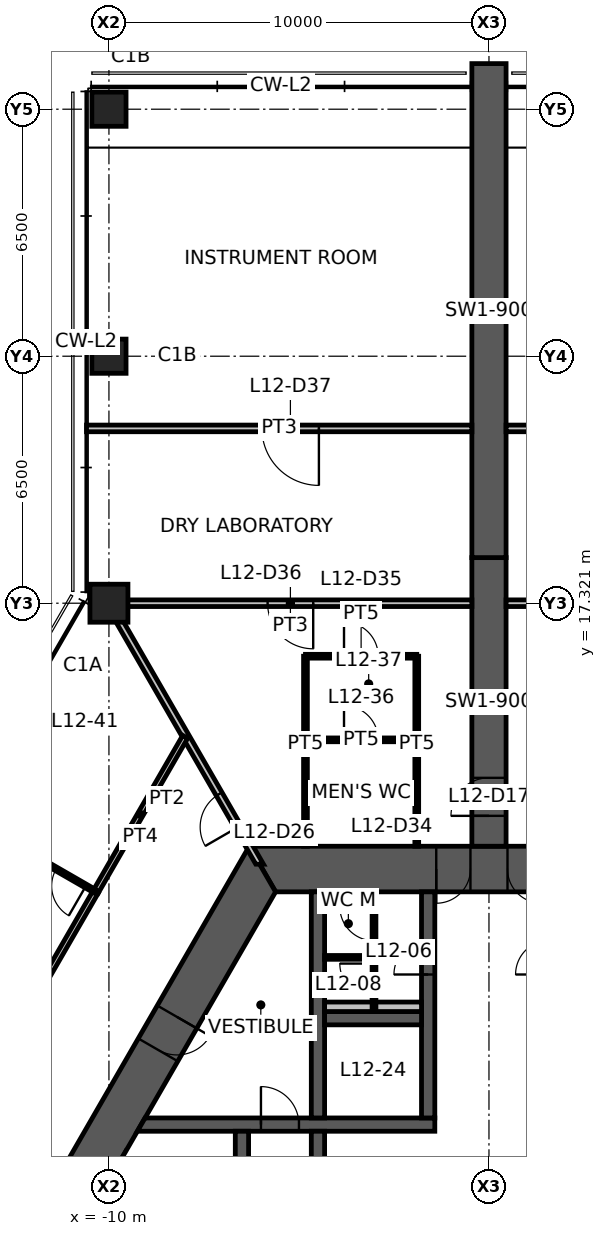
"""IFC4 building model, lengths in metres.
Left out: names, types, materials, properties, quantities, classifications, styles, units other than length and angle.
Written with IfcOpenShell. Run it as: python <this file> out.ifc"""

import sys

from ifc_helpers import new_model, si_unit, direction, frame, frame_2d, origin, origin_2d, place, context, subcontext, project, spatial, polyline, rectangle, hollow_rectangle, outline, extrude, element, fill, save


model = new_model("IFC4")
c1 = context("Model", 3, precision=1e-05, world=origin(), true_north=direction((0.0, 1.0)))
c2 = subcontext(c1, "Body", "Model", "MODEL_VIEW")
j1 = project(units=[si_unit("LENGTHUNIT", "METRE"), si_unit("PLANEANGLEUNIT", "RADIAN")], contexts=[c1])
p1 = place(None, origin())
s1 = spatial("IfcSite", under=j1, at=p1, CompositionType="ELEMENT")
p2 = place(p1, origin())
s2 = spatial("IfcBuilding", under=s1, at=p2, CompositionType="ELEMENT")
p3 = place(p2, frame((0.0, 0.0, 47.8)))
s3 = spatial("IfcBuildingStorey", under=s2, at=p3, CompositionType="ELEMENT", Elevation=47.8)
p4 = place(p3, frame((-10.0, 17.321, 0.0), z_axis=(0.0, 0.0, 1.0), x_axis=(1.0, 0.0, 0.0)))
e1 = element("IfcColumn", 1, at=p4, inside=s3, PredefinedType="COLUMN", context=c2, shape_type="SweptSolid", body=[
    extrude(hollow_rectangle(XDim=1.0, YDim=1.0, WallThickness=0.06, at=origin_2d()), origin(), (0.0, 0.0, 1.0), 4.2),
])
for number, where, z_axis, x_axis in (
    (2, (-10.0, 23.821, 0.0), (0.0, 0.0, 1.0), (1.0, 0.0, 0.0)),
    (3, (-10.0, 30.321, 0.0), (0.0, 0.0, 1.0), (1.0, 0.0, 0.0)),
):
    element("IfcColumn", number, at=place(p3, frame(where, z_axis=z_axis, x_axis=x_axis)), inside=s3, PredefinedType="COLUMN", context=c2, shape_type="SweptSolid", body=[
        extrude(hollow_rectangle(XDim=0.9, YDim=0.9, WallThickness=0.05, at=origin_2d()), origin(), (0.0, 0.0, 1.0), 4.2),
    ])
p5 = place(p3, frame((5.961, 10.325, 0.0), z_axis=(0.0, 0.0, 1.0), x_axis=(-1.0, 0.0, 0.0)))
e4 = element("IfcWall", 4, at=p5, inside=s3, PredefinedType="SHEAR", context=c2, shape_type="SweptSolid", body=[
    extrude(outline(polyline([(-0.346, -0.6), (4.574, -0.6), (5.474, -0.6), (6.449, -0.6), (7.349, -0.6), (12.269, -0.6), (11.576, 0.6), (7.349, 0.6), (6.449, 0.6), (5.474, 0.6), (4.574, 0.6), (0.346, 0.6), (-0.346, -0.6)])), origin(), (0.0, 0.0, 1.0), 4.2),
])
p6 = place(p5, frame((6.449, 0.0, 0.0)))
e5 = element("IfcOpeningElement", 5, at=p6, cuts=e4, PredefinedType="OPENING", context=c2, shape_type="SweptSolid", body=[
    extrude(rectangle(XDim=0.9, YDim=2.1, at=frame_2d((0.45, 1.05))), frame((0.0, 0.61, 0.0), z_axis=(0.0, -1.0, 0.0), x_axis=(1.0, 0.0, 0.0)), (0.0, 0.0, 1.0), 1.22),
])
p7 = place(p5, frame((4.574, 0.0, 0.0)))
e6 = element("IfcOpeningElement", 6, at=p7, cuts=e4, PredefinedType="OPENING", context=c2, shape_type="SweptSolid", body=[
    extrude(rectangle(XDim=0.9, YDim=2.1, at=frame_2d((0.45, 1.05))), frame((0.0, 0.61, 0.0), z_axis=(0.0, -1.0, 0.0), x_axis=(1.0, 0.0, 0.0)), (0.0, 0.0, 1.0), 1.22),
])
p8 = place(p3, frame((-5.961, 10.325, 0.0), z_axis=(0.0, 0.0, 1.0), x_axis=(-0.500004296715, -0.866022923061, 0.0)))
e7 = element("IfcWall", 7, at=p8, inside=s3, PredefinedType="SHEAR", context=c2, shape_type="SweptSolid", body=[
    extrude(outline(polyline([(-0.346, -0.6), (4.494, -0.6), (5.494, -0.6), (12.269, -0.6), (11.576, 0.6), (5.494, 0.6), (4.494, 0.6), (0.346, 0.6), (-0.346, -0.6)])), origin(), (0.0, 0.0, 1.0), 4.2),
])
p9 = place(p8, frame((4.494, 0.0, 0.0)))
e8 = element("IfcOpeningElement", 8, at=p9, cuts=e7, PredefinedType="OPENING", context=c2, shape_type="SweptSolid", body=[
    extrude(rectangle(XDim=1.0, YDim=2.1, at=frame_2d((0.5, 1.05))), frame((0.0, 0.61, 0.0), z_axis=(0.0, -1.0, 0.0), x_axis=(1.0, 0.0, 0.0)), (0.0, 0.0, 1.0), 1.22),
])
p10 = place(p3, frame((0.0, 10.925, 0.0), z_axis=(0.0, 0.0, 1.0), x_axis=(0.0, 1.0, 0.0)))
e9 = element("IfcWall", 9, at=p10, inside=s3, PredefinedType="SHEAR", context=c2, shape_type="SweptSolid", body=[
    extrude(rectangle(XDim=7.595, YDim=0.9, at=frame_2d((3.798, 0.0))), origin(), (0.0, 0.0, 1.0), 4.2),
])
p11 = place(p10, frame((0.8, 0.0, 0.0)))
e10 = element("IfcOpeningElement", 10, at=p11, cuts=e9, PredefinedType="OPENING", context=c2, shape_type="SweptSolid", body=[
    extrude(rectangle(XDim=1.0, YDim=2.1, at=frame_2d((0.5, 1.05))), frame((0.0, 0.46, 0.0), z_axis=(0.0, -1.0, 0.0), x_axis=(1.0, 0.0, 0.0)), (0.0, 0.0, 1.0), 0.92),
])
p12 = place(p3, frame((0.0, 18.521, 0.0), z_axis=(0.0, 0.0, 1.0), x_axis=(0.0, 1.0, 0.0)))
e11 = element("IfcWall", 11, at=p12, inside=s3, PredefinedType="SHEAR", context=c2, shape_type="SweptSolid", body=[
    extrude(rectangle(XDim=13.0, YDim=0.9, at=frame_2d((6.5, 0.0))), origin(), (0.0, 0.0, 1.0), 4.2),
])
p13 = place(p3, frame((-9.151, 3.6, 0.0), z_axis=(0.0, 0.0, 1.0), x_axis=(1.0, 0.0, 0.0)))
e12 = element("IfcWall", 12, at=p13, inside=s3, PredefinedType="SHEAR", context=c2, shape_type="SweptSolid", body=[
    extrude(outline(polyline([(-0.101, -0.175), (3.151, -0.175), (4.151, -0.175), (7.726, -0.175), (7.726, 0.175), (4.151, 0.175), (3.151, 0.175), (0.101, 0.175), (-0.101, -0.175)])), origin(), (0.0, 0.0, 1.0), 4.2),
])
p14 = place(p13, frame((3.151, 0.0, 0.0)))
e13 = element("IfcOpeningElement", 13, at=p14, cuts=e12, PredefinedType="OPENING", context=c2, shape_type="SweptSolid", body=[
    extrude(rectangle(XDim=1.0, YDim=2.1, at=frame_2d((0.5, 1.05))), frame((0.0, 0.185, 0.0), z_axis=(0.0, -1.0, 0.0), x_axis=(1.0, 0.0, 0.0)), (0.0, 0.0, 1.0), 0.37),
])
p15 = place(p3, frame((-1.6, 3.775, 0.0), z_axis=(0.0, 0.0, 1.0), x_axis=(0.0, 1.0, 0.0)))
e14 = element("IfcWall", 14, at=p15, inside=s3, PredefinedType="SHEAR", context=c2, shape_type="SweptSolid", body=[
    extrude(rectangle(XDim=5.95, YDim=0.35, at=frame_2d((2.975, 0.0))), origin(), (0.0, 0.0, 1.0), 4.2),
])
p16 = place(p15, frame((3.775, 0.0, 0.0)))
e15 = element("IfcOpeningElement", 15, at=p16, cuts=e14, PredefinedType="OPENING", context=c2, shape_type="SweptSolid", body=[
    extrude(rectangle(XDim=0.9, YDim=2.1, at=frame_2d((0.45, 1.05))), frame((0.0, 0.185, 0.0), z_axis=(0.0, -1.0, 0.0), x_axis=(1.0, 0.0, 0.0)), (0.0, 0.0, 1.0), 0.37),
])
p17 = place(p3, frame((-4.5, -3.425, 0.0), z_axis=(0.0, 0.0, 1.0), x_axis=(0.0, 1.0, 0.0)))
e16 = element("IfcWall", 16, at=p17, inside=s3, PredefinedType="SHEAR", context=c2, shape_type="SweptSolid", body=[
    extrude(rectangle(XDim=6.85, YDim=0.35, at=frame_2d((3.425, 0.0))), origin(), (0.0, 0.0, 1.0), 4.2),
])
p18 = place(p17, frame((2.925, 0.0, 0.0)))
e17 = element("IfcOpeningElement", 17, at=p18, cuts=e16, PredefinedType="OPENING", context=c2, shape_type="SweptSolid", body=[
    extrude(rectangle(XDim=1.0, YDim=2.1, at=frame_2d((0.5, 1.05))), frame((0.0, 0.185, 0.0), z_axis=(0.0, -1.0, 0.0), x_axis=(1.0, 0.0, 0.0)), (0.0, 0.0, 1.0), 0.37),
])
p19 = place(p3, frame((-6.5, -3.425, 0.0), z_axis=(0.0, 0.0, 1.0), x_axis=(0.0, 1.0, 0.0)))
e18 = element("IfcWall", 18, at=p19, inside=s3, PredefinedType="SHEAR", context=c2, shape_type="SweptSolid", body=[
    extrude(rectangle(XDim=6.85, YDim=0.35, at=frame_2d((3.425, 0.0))), origin(), (0.0, 0.0, 1.0), 4.2),
])
p20 = place(p19, frame((0.1, 0.0, 0.0)))
e19 = element("IfcOpeningElement", 19, at=p20, cuts=e18, PredefinedType="OPENING", context=c2, shape_type="SweptSolid", body=[
    extrude(rectangle(XDim=1.0, YDim=2.1, at=frame_2d((0.5, 1.05))), frame((0.0, 0.185, 0.0), z_axis=(0.0, -1.0, 0.0), x_axis=(1.0, 0.0, 0.0)), (0.0, 0.0, 1.0), 0.37),
])
p21 = place(p3, frame((-4.5, 3.775, 0.0), z_axis=(0.0, 0.0, 1.0), x_axis=(0.0, 1.0, 0.0)))
e20 = element("IfcWall", 20, at=p21, inside=s3, PredefinedType="SHEAR", context=c2, shape_type="SweptSolid", body=[
    extrude(rectangle(XDim=5.95, YDim=0.35, at=frame_2d((2.975, 0.0))), origin(), (0.0, 0.0, 1.0), 4.2),
])
p22 = place(p3, frame((-4.325, 6.4, 0.0), z_axis=(0.0, 0.0, 1.0), x_axis=(1.0, 0.0, 0.0)))
e21 = element("IfcWall", 21, at=p22, inside=s3, PredefinedType="SHEAR", context=c2, shape_type="SweptSolid", body=[
    extrude(rectangle(XDim=2.55, YDim=0.35, at=frame_2d((1.275, 0.0))), origin(), (0.0, 0.0, 1.0), 4.2),
])
p23 = place(p3, frame((-4.325, 6.7, 0.0), z_axis=(0.0, 0.0, 1.0), x_axis=(1.0, 0.0, 0.0)))
e22 = element("IfcWall", 22, at=p23, inside=s3, PredefinedType="PLUMBINGWALL", context=c2, shape_type="SweptSolid", body=[
    extrude(rectangle(XDim=2.55, YDim=0.25, at=frame_2d((1.275, 0.0))), origin(), (0.0, 0.0, 1.0), 4.2),
])
p24 = place(p3, frame((-3.025, 6.575, 0.0), z_axis=(0.0, 0.0, 1.0), x_axis=(0.0, 1.0, 0.0)))
e23 = element("IfcWall", 23, at=p24, inside=s3, PredefinedType="PARTITIONING", context=c2, shape_type="SweptSolid", body=[
    extrude(rectangle(XDim=3.15, YDim=0.1, at=frame_2d((1.575, 0.0))), origin(), (0.0, 0.0, 1.0), 2.65),
])
p25 = place(p24, frame((1.863, 0.0, 0.0)))
e24 = element("IfcOpeningElement", 24, at=p25, cuts=e23, PredefinedType="OPENING", context=c2, shape_type="SweptSolid", body=[
    extrude(rectangle(XDim=0.9, YDim=2.1, at=frame_2d((0.45, 1.05))), frame((0.0, 0.06, 0.0), z_axis=(0.0, -1.0, 0.0), x_axis=(1.0, 0.0, 0.0)), (0.0, 0.0, 1.0), 0.12),
])
p26 = place(p24, frame((0.363, 0.0, 0.0)))
e25 = element("IfcOpeningElement", 25, at=p26, cuts=e23, PredefinedType="OPENING", context=c2, shape_type="SweptSolid", body=[
    extrude(rectangle(XDim=0.9, YDim=2.1, at=frame_2d((0.45, 1.05))), frame((0.0, 0.06, 0.0), z_axis=(0.0, -1.0, 0.0), x_axis=(1.0, 0.0, 0.0)), (0.0, 0.0, 1.0), 0.12),
])
p27 = place(p3, frame((-3.075, 8.0, 0.0), z_axis=(0.0, 0.0, 1.0), x_axis=(-1.0, 0.0, 0.0)))
e26 = element("IfcWall", 26, at=p27, inside=s3, PredefinedType="PARTITIONING", context=c2, shape_type="SweptSolid", body=[
    extrude(rectangle(XDim=1.25, YDim=0.1, at=frame_2d((0.625, 0.0))), origin(), (0.0, 0.0, 1.0), 2.65),
])
p28 = place(p3, frame((-6.035, 10.453, 0.0), z_axis=(0.0, 0.0, 1.0), x_axis=(-0.499993402427, 0.866029212861, 0.0)))
e27 = element("IfcWall", 27, at=p28, inside=s3, PredefinedType="PARTITIONING", context=c2, shape_type="SweptSolid", body=[
    extrude(outline(polyline([(-0.051, -0.087), (1.129, -0.087), (2.129, -0.087), (7.93, -0.087), (7.93, 0.087), (2.129, 0.087), (1.129, 0.087), (0.051, 0.087), (-0.051, -0.087)])), origin(), (0.0, 0.0, 1.0), 3.05),
])
p29 = place(p28, frame((1.129, 0.0, 0.0)))
e28 = element("IfcOpeningElement", 28, at=p29, cuts=e27, PredefinedType="OPENING", context=c2, shape_type="SweptSolid", body=[
    extrude(rectangle(XDim=1.0, YDim=2.1, at=frame_2d((0.5, 1.05))), frame((0.0, 0.098, 0.0), z_axis=(0.0, -1.0, 0.0), x_axis=(1.0, 0.0, 0.0)), (0.0, 0.0, 1.0), 0.195),
])
p30 = place(p3, frame((0.45, 17.321, 0.0), z_axis=(0.0, 0.0, 1.0), x_axis=(1.0, 0.0, 0.0)))
e29 = element("IfcWall", 29, at=p30, inside=s3, PredefinedType="PARTITIONING", context=c2, shape_type="SweptSolid", body=[
    extrude(rectangle(XDim=9.55, YDim=0.175, at=frame_2d((4.775, 0.0))), origin(), (0.0, 0.0, 1.0), 2.95),
])
p31 = place(p30, frame((4.175, 0.0, 0.0)))
e30 = element("IfcOpeningElement", 30, at=p31, cuts=e29, PredefinedType="OPENING", context=c2, shape_type="SweptSolid", body=[
    extrude(rectangle(XDim=1.2, YDim=2.1, at=frame_2d((0.6, 1.05))), frame((0.0, 0.098, 0.0), z_axis=(0.0, -1.0, 0.0), x_axis=(1.0, 0.0, 0.0)), (0.0, 0.0, 1.0), 0.195),
])
p32 = place(p3, frame((0.45, 21.92, 0.0), z_axis=(0.0, 0.0, 1.0), x_axis=(1.0, 0.0, 0.0)))
e31 = element("IfcWall", 31, at=p32, inside=s3, PredefinedType="PARTITIONING", context=c2, shape_type="SweptSolid", body=[
    extrude(rectangle(XDim=10.14, YDim=0.175, at=frame_2d((5.07, 0.0))), origin(), (0.0, 0.0, 1.0), 3.95),
])
p33 = place(p32, frame((4.025, 0.0, 0.0)))
e32 = element("IfcOpeningElement", 32, at=p33, cuts=e31, PredefinedType="OPENING", context=c2, shape_type="SweptSolid", body=[
    extrude(rectangle(XDim=1.5, YDim=2.1, at=frame_2d((0.75, 1.05))), frame((0.0, 0.098, 0.0), z_axis=(0.0, -1.0, 0.0), x_axis=(1.0, 0.0, 0.0)), (0.0, 0.0, 1.0), 0.195),
])
p34 = place(p3, frame((-4.829, 13.725, 0.0), z_axis=(0.0, 0.0, 1.0), x_axis=(1.0, 0.0, 0.0)))
e33 = element("IfcWall", 33, at=p34, inside=s3, PredefinedType="PARTITIONING", context=c2, shape_type="SweptSolid", body=[
    extrude(rectangle(XDim=2.929, YDim=0.1, at=frame_2d((1.464, 0.0))), origin(), (0.0, 0.0, 1.0), 2.65),
])
p35 = place(p34, frame((1.014, 0.0, 0.0)))
e34 = element("IfcOpeningElement", 34, at=p35, cuts=e33, PredefinedType="OPENING", context=c2, shape_type="SweptSolid", body=[
    extrude(rectangle(XDim=0.9, YDim=2.1, at=frame_2d((0.45, 1.05))), frame((0.0, 0.06, 0.0), z_axis=(0.0, -1.0, 0.0), x_axis=(1.0, 0.0, 0.0)), (0.0, 0.0, 1.0), 0.12),
])
p36 = place(p3, frame((-4.829, 15.925, 0.0), z_axis=(0.0, 0.0, 1.0), x_axis=(1.0, 0.0, 0.0)))
e35 = element("IfcWall", 35, at=p36, inside=s3, PredefinedType="PARTITIONING", context=c2, shape_type="SweptSolid", body=[
    extrude(rectangle(XDim=2.929, YDim=0.1, at=frame_2d((1.464, 0.0))), origin(), (0.0, 0.0, 1.0), 2.65),
])
p37 = place(p36, frame((1.014, 0.0, 0.0)))
e36 = element("IfcOpeningElement", 36, at=p37, cuts=e35, PredefinedType="OPENING", context=c2, shape_type="SweptSolid", body=[
    extrude(rectangle(XDim=0.9, YDim=2.1, at=frame_2d((0.45, 1.05))), frame((0.0, 0.06, 0.0), z_axis=(0.0, -1.0, 0.0), x_axis=(1.0, 0.0, 0.0)), (0.0, 0.0, 1.0), 0.12),
])
for number, where, z_axis, x_axis in (
    (37, (-1.9, 10.925, 0.0), (0.0, 0.0, 1.0), (0.0, 1.0, 0.0)),
    (38, (-4.829, 10.925, 0.0), (0.0, 0.0, 1.0), (0.0, 1.0, 0.0)),
):
    element("IfcWall", number, at=place(p3, frame(where, z_axis=z_axis, x_axis=x_axis)), inside=s3, PredefinedType="PARTITIONING", context=c2, shape_type="SweptSolid", body=[
        extrude(rectangle(XDim=5.0, YDim=0.1, at=frame_2d((2.5, 0.0))), origin(), (0.0, 0.0, 1.0), 2.65),
    ])
p38 = place(p3, frame((-0.45, 17.321, 0.0), z_axis=(0.0, 0.0, 1.0), x_axis=(-1.0, 0.0, 0.0)))
e39 = element("IfcWall", 39, at=p38, inside=s3, PredefinedType="PARTITIONING", context=c2, shape_type="SweptSolid", body=[
    extrude(rectangle(XDim=9.55, YDim=0.175, at=frame_2d((4.775, 0.0))), origin(), (0.0, 0.0, 1.0), 2.95),
])
p39 = place(p38, frame((4.175, 0.0, 0.0)))
e40 = element("IfcOpeningElement", 40, at=p39, cuts=e39, PredefinedType="OPENING", context=c2, shape_type="SweptSolid", body=[
    extrude(rectangle(XDim=1.2, YDim=2.1, at=frame_2d((0.6, 1.05))), frame((0.0, 0.098, 0.0), z_axis=(0.0, -1.0, 0.0), x_axis=(1.0, 0.0, 0.0)), (0.0, 0.0, 1.0), 0.195),
])
p40 = place(p3, frame((-0.45, 21.92, 0.0), z_axis=(0.0, 0.0, 1.0), x_axis=(-1.0, 0.0, 0.0)))
e41 = element("IfcWall", 41, at=p40, inside=s3, PredefinedType="PARTITIONING", context=c2, shape_type="SweptSolid", body=[
    extrude(rectangle(XDim=10.14, YDim=0.175, at=frame_2d((5.07, 0.0))), origin(), (0.0, 0.0, 1.0), 3.95),
])
p41 = place(p40, frame((4.025, 0.0, 0.0)))
e42 = element("IfcOpeningElement", 42, at=p41, cuts=e41, PredefinedType="OPENING", context=c2, shape_type="SweptSolid", body=[
    extrude(rectangle(XDim=1.5, YDim=2.1, at=frame_2d((0.75, 1.05))), frame((0.0, 0.098, 0.0), z_axis=(0.0, -1.0, 0.0), x_axis=(1.0, 0.0, 0.0)), (0.0, 0.0, 1.0), 0.195),
])
p42 = place(p3, frame((-10.352, 9.719, 0.0), z_axis=(0.0, 0.0, 1.0), x_axis=(0.499985273446, 0.866033905998, 0.0)))
e43 = element("IfcWall", 43, at=p42, inside=s3, PredefinedType="PARTITIONING", context=c2, shape_type="SweptSolid", body=[
    extrude(rectangle(XDim=4.718, YDim=0.15, at=frame_2d((2.359, 0.0))), origin(), (0.0, 0.0, 1.0), 2.65),
])
p43 = place(p3, frame((-13.598, 4.097, 0.0), z_axis=(0.0, 0.0, 1.0), x_axis=(0.49998791073, 0.866032383415, 0.0)))
e44 = element("IfcWall", 44, at=p43, inside=s3, PredefinedType="PARTITIONING", context=c2, shape_type="SweptSolid", body=[
    extrude(rectangle(XDim=6.502, YDim=0.15, at=frame_2d((3.251, 0.0))), origin(), (0.0, 0.0, 1.0), 2.65),
])
p44 = place(p43, frame((2.751, 0.0, 0.0)))
e45 = element("IfcOpeningElement", 45, at=p44, cuts=e44, PredefinedType="OPENING", context=c2, shape_type="SweptSolid", body=[
    extrude(rectangle(XDim=1.0, YDim=2.1, at=frame_2d((0.5, 1.05))), frame((0.0, 0.085, 0.0), z_axis=(0.0, -1.0, 0.0), x_axis=(1.0, 0.0, 0.0)), (0.0, 0.0, 1.0), 0.17),
])
p45 = place(p3, frame((-10.347, 9.728, 0.0), z_axis=(0.0, 0.0, 1.0), x_axis=(-0.866583023507, 0.499032928142, 0.0)))
e46 = element("IfcWall", 46, at=p45, inside=s3, PredefinedType="PARTITIONING", context=c2, shape_type="SweptSolid", body=[
    extrude(rectangle(XDim=3.975, YDim=0.1, at=frame_2d((1.988, 0.0))), origin(), (0.0, 0.0, 1.0), 2.65),
])
p46 = place(p45, frame((0.3, 0.0, 0.0)))
e47 = element("IfcOpeningElement", 47, at=p46, cuts=e46, PredefinedType="OPENING", context=c2, shape_type="SweptSolid", body=[
    extrude(rectangle(XDim=0.9, YDim=2.1, at=frame_2d((0.45, 1.05))), frame((0.0, 0.06, 0.0), z_axis=(0.0, -1.0, 0.0), x_axis=(1.0, 0.0, 0.0)), (0.0, 0.0, 1.0), 0.12),
])
p47 = place(p6, origin())
e48 = element("IfcDoor", 48, at=p47, inside=s3, OperationType="SINGLE_SWING_RIGHT", PredefinedType="DOOR", context=c2, shape_type="SweptSolid", body=[
    extrude(rectangle(XDim=0.9, YDim=2.1, at=frame_2d((0.45, 1.05))), frame((0.0, 0.025, 0.0), z_axis=(0.0, -1.0, 0.0), x_axis=(1.0, 0.0, 0.0)), (0.0, 0.0, 1.0), 0.05),
])
fill(e5, e48)
p48 = place(p7, origin())
e49 = element("IfcDoor", 49, at=p48, inside=s3, OperationType="SINGLE_SWING_LEFT", PredefinedType="DOOR", context=c2, shape_type="SweptSolid", body=[
    extrude(rectangle(XDim=0.9, YDim=2.1, at=frame_2d((0.45, 1.05))), frame((0.0, 0.025, 0.0), z_axis=(0.0, -1.0, 0.0), x_axis=(1.0, 0.0, 0.0)), (0.0, 0.0, 1.0), 0.05),
])
fill(e6, e49)
p49 = place(p9, origin())
e50 = element("IfcDoor", 50, at=p49, inside=s3, OperationType="SINGLE_SWING_LEFT", PredefinedType="DOOR", context=c2, shape_type="SweptSolid", body=[
    extrude(rectangle(XDim=1.0, YDim=2.1, at=frame_2d((0.5, 1.05))), frame((0.0, 0.025, 0.0), z_axis=(0.0, -1.0, 0.0), x_axis=(1.0, 0.0, 0.0)), (0.0, 0.0, 1.0), 0.05),
])
fill(e8, e50)
p50 = place(p14, origin())
e51 = element("IfcDoor", 51, at=p50, inside=s3, OperationType="SINGLE_SWING_LEFT", PredefinedType="DOOR", context=c2, shape_type="SweptSolid", body=[
    extrude(rectangle(XDim=1.0, YDim=2.1, at=frame_2d((0.5, 1.05))), frame((0.0, 0.025, 0.0), z_axis=(0.0, -1.0, 0.0), x_axis=(1.0, 0.0, 0.0)), (0.0, 0.0, 1.0), 0.05),
])
fill(e13, e51)
p51 = place(p16, origin())
e52 = element("IfcDoor", 52, at=p51, inside=s3, OperationType="SINGLE_SWING_LEFT", PredefinedType="DOOR", context=c2, shape_type="SweptSolid", body=[
    extrude(rectangle(XDim=0.9, YDim=2.1, at=frame_2d((0.45, 1.05))), frame((0.0, 0.025, 0.0), z_axis=(0.0, -1.0, 0.0), x_axis=(1.0, 0.0, 0.0)), (0.0, 0.0, 1.0), 0.05),
])
fill(e15, e52)
p52 = place(p11, origin())
e53 = element("IfcDoor", 53, at=p52, inside=s3, OperationType="SINGLE_SWING_LEFT", PredefinedType="DOOR", context=c2, shape_type="SweptSolid", body=[
    extrude(rectangle(XDim=1.0, YDim=2.1, at=frame_2d((0.5, 1.05))), frame((0.0, 0.025, 0.0), z_axis=(0.0, -1.0, 0.0), x_axis=(1.0, 0.0, 0.0)), (0.0, 0.0, 1.0), 0.05),
])
fill(e10, e53)
p53 = place(p25, origin())
e54 = element("IfcDoor", 54, at=p53, inside=s3, OperationType="SINGLE_SWING_RIGHT", PredefinedType="DOOR", context=c2, shape_type="SweptSolid", body=[
    extrude(rectangle(XDim=0.9, YDim=2.1, at=frame_2d((0.45, 1.05))), frame((0.0, 0.025, 0.0), z_axis=(0.0, -1.0, 0.0), x_axis=(1.0, 0.0, 0.0)), (0.0, 0.0, 1.0), 0.05),
])
fill(e24, e54)
p54 = place(p26, origin())
e55 = element("IfcDoor", 55, at=p54, inside=s3, OperationType="SINGLE_SWING_RIGHT", PredefinedType="DOOR", context=c2, shape_type="SweptSolid", body=[
    extrude(rectangle(XDim=0.9, YDim=2.1, at=frame_2d((0.45, 1.05))), frame((0.0, 0.025, 0.0), z_axis=(0.0, -1.0, 0.0), x_axis=(1.0, 0.0, 0.0)), (0.0, 0.0, 1.0), 0.05),
])
fill(e25, e55)
p55 = place(p29, origin())
e56 = element("IfcDoor", 56, at=p55, inside=s3, OperationType="SINGLE_SWING_LEFT", PredefinedType="DOOR", context=c2, shape_type="SweptSolid", body=[
    extrude(rectangle(XDim=1.0, YDim=2.1, at=frame_2d((0.5, 1.05))), frame((0.0, 0.025, 0.0), z_axis=(0.0, -1.0, 0.0), x_axis=(1.0, 0.0, 0.0)), (0.0, 0.0, 1.0), 0.05),
])
fill(e28, e56)
p56 = place(p35, origin())
e57 = element("IfcDoor", 57, at=p56, inside=s3, OperationType="SINGLE_SWING_LEFT", PredefinedType="DOOR", context=c2, shape_type="SweptSolid", body=[
    extrude(rectangle(XDim=0.9, YDim=2.1, at=frame_2d((0.45, 1.05))), frame((0.0, 0.025, 0.0), z_axis=(0.0, -1.0, 0.0), x_axis=(1.0, 0.0, 0.0)), (0.0, 0.0, 1.0), 0.05),
])
fill(e34, e57)
p57 = place(p37, origin())
e58 = element("IfcDoor", 58, at=p57, inside=s3, OperationType="SINGLE_SWING_LEFT", PredefinedType="DOOR", context=c2, shape_type="SweptSolid", body=[
    extrude(rectangle(XDim=0.9, YDim=2.1, at=frame_2d((0.45, 1.05))), frame((0.0, 0.025, 0.0), z_axis=(0.0, -1.0, 0.0), x_axis=(1.0, 0.0, 0.0)), (0.0, 0.0, 1.0), 0.05),
])
fill(e36, e58)
p58 = place(p39, origin())
e59 = element("IfcDoor", 59, at=p58, inside=s3, OperationType="DOUBLE_DOOR_SINGLE_SWING", PredefinedType="DOOR", context=c2, shape_type="SweptSolid", body=[
    extrude(rectangle(XDim=1.2, YDim=2.1, at=frame_2d((0.6, 1.05))), frame((0.0, 0.025, 0.0), z_axis=(0.0, -1.0, 0.0), x_axis=(1.0, 0.0, 0.0)), (0.0, 0.0, 1.0), 0.05),
])
fill(e40, e59)
p59 = place(p41, origin())
e60 = element("IfcDoor", 60, at=p59, inside=s3, OperationType="DOUBLE_DOOR_SINGLE_SWING", PredefinedType="DOOR", context=c2, shape_type="SweptSolid", body=[
    extrude(rectangle(XDim=1.5, YDim=2.1, at=frame_2d((0.75, 1.05))), frame((0.0, 0.025, 0.0), z_axis=(0.0, -1.0, 0.0), x_axis=(1.0, 0.0, 0.0)), (0.0, 0.0, 1.0), 0.05),
])
fill(e42, e60)
p60 = place(p46, origin())
e61 = element("IfcDoor", 61, at=p60, inside=s3, OperationType="SINGLE_SWING_LEFT", PredefinedType="DOOR", context=c2, shape_type="SweptSolid", body=[
    extrude(rectangle(XDim=0.9, YDim=2.1, at=frame_2d((0.45, 1.05))), frame((0.0, 0.025, 0.0), z_axis=(0.0, -1.0, 0.0), x_axis=(1.0, 0.0, 0.0)), (0.0, 0.0, 1.0), 0.05),
])
fill(e47, e61)
save(model, sys.argv[1])
